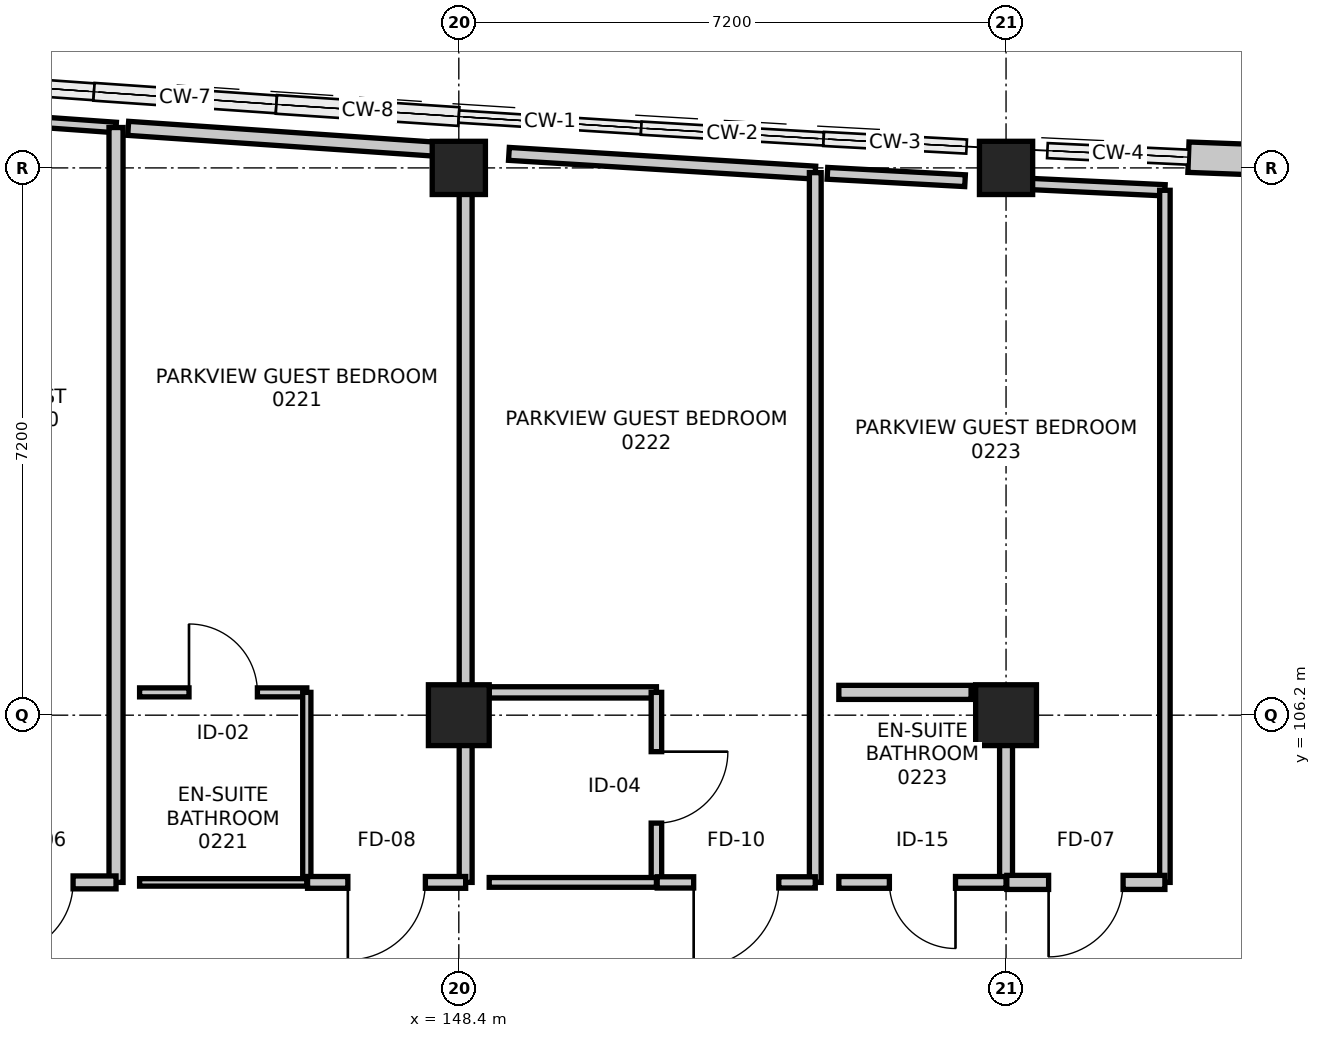
"""IFC4 building model, lengths in metres.
Left out: names, types, materials, properties, quantities, classifications, styles, units other than length and angle.
Written with IfcOpenShell. Run it as: python <this file> out.ifc"""

import sys

from ifc_helpers import new_model, si_unit, direction, frame, frame_2d, origin, origin_2d, place, context, subcontext, project, spatial, rectangle, extrude, element, fill, save


model = new_model("IFC4")
c1 = context("Model", 3, precision=1e-05, world=origin(), true_north=direction((0.0, 1.0)))
c2 = subcontext(c1, "Body", "Model", "MODEL_VIEW")
j1 = project(units=[si_unit("LENGTHUNIT", "METRE"), si_unit("PLANEANGLEUNIT", "RADIAN")], contexts=[c1])
p1 = place(None, origin())
s1 = spatial("IfcSite", under=j1, at=p1, CompositionType="ELEMENT")
p2 = place(p1, origin())
s2 = spatial("IfcBuilding", under=s1, at=p2, CompositionType="ELEMENT")
p3 = place(p2, frame((0.0, 0.0, 10.5)))
s3 = spatial("IfcBuildingStorey", under=s2, at=p3, CompositionType="ELEMENT", Elevation=10.5)
p4 = place(p3, frame((148.4, 106.2, 0.0), z_axis=(0.0, 0.0, 1.0), x_axis=(1.0, 0.0, 0.0)))
e1 = element("IfcColumn", 1, at=p4, inside=s3, PredefinedType="COLUMN", context=c2, shape_type="SweptSolid", body=[
    extrude(rectangle(XDim=0.8, YDim=0.8, at=origin_2d()), origin(), (0.0, 0.0, 1.0), 4.5),
])
p5 = place(p3, frame((148.4, 113.4, 0.0), z_axis=(0.0, 0.0, 1.0), x_axis=(1.0, 0.0, 0.0)))
e2 = element("IfcColumn", 2, at=p5, inside=s3, PredefinedType="COLUMN", context=c2, shape_type="SweptSolid", body=[
    extrude(rectangle(XDim=0.7, YDim=0.7, at=origin_2d()), origin(), (0.0, 0.0, 1.0), 4.5),
])
p6 = place(p3, frame((155.6, 106.2, 0.0), z_axis=(0.0, 0.0, 1.0), x_axis=(1.0, 0.0, 0.0)))
e3 = element("IfcColumn", 3, at=p6, inside=s3, PredefinedType="COLUMN", context=c2, shape_type="SweptSolid", body=[
    extrude(rectangle(XDim=0.8, YDim=0.8, at=origin_2d()), origin(), (0.0, 0.0, 1.0), 4.5),
])
p7 = place(p3, frame((155.6, 113.4, 0.0), z_axis=(0.0, 0.0, 1.0), x_axis=(1.0, 0.0, 0.0)))
e4 = element("IfcColumn", 4, at=p7, inside=s3, PredefinedType="COLUMN", context=c2, shape_type="SweptSolid", body=[
    extrude(rectangle(XDim=0.7, YDim=0.7, at=origin_2d()), origin(), (0.0, 0.0, 1.0), 4.5),
])
p8 = place(p3, frame((158.0, 113.541, 0.0), z_axis=(0.0, 0.0, 1.0), x_axis=(0.99930757318, -0.037207179225, 0.0)))
e5 = element("IfcWall", 5, at=p8, inside=s3, PredefinedType="STANDARD", context=c2, shape_type="SweptSolid", body=[
    extrude(rectangle(XDim=2.402, YDim=0.4, at=frame_2d((1.201, 0.0))), origin(), (0.0, 0.0, 1.0), 3.455),
])
p9 = place(p3, frame((139.45, 114.247, 0.0), z_axis=(0.0, 0.0, 1.0), x_axis=(0.997489787664, -0.070810475964, 0.0)))
e6 = element("IfcWall", 6, at=p9, inside=s3, PredefinedType="PARTITIONING", context=c2, shape_type="SweptSolid", body=[
    extrude(rectangle(XDim=4.451, YDim=0.138, at=frame_2d((2.226, 0.0))), origin(), (0.0, 0.0, 1.0), 3.796),
])
p10 = place(p3, frame((143.89, 113.931, 0.0), z_axis=(0.0, 0.0, 1.0), x_axis=(0.0, -1.0, 0.0)))
e7 = element("IfcWall", 7, at=p10, inside=s3, PredefinedType="PARTITIONING", context=c2, shape_type="SweptSolid", body=[
    extrude(rectangle(XDim=9.931, YDim=0.185, at=frame_2d((4.966, 0.0))), origin(), (0.0, 0.0, 1.0), 3.455),
])
p11 = place(p3, frame((143.89, 104.0, 0.0), z_axis=(0.0, 0.0, 1.0), x_axis=(-1.0, 0.0, 0.0)))
e8 = element("IfcWall", 8, at=p11, inside=s3, PredefinedType="PARTITIONING", context=c2, shape_type="SweptSolid", body=[
    extrude(rectangle(XDim=2.08, YDim=0.17, at=frame_2d((1.04, 0.0))), origin(), (0.0, 0.0, 1.0), 4.22),
])
p12 = place(p11, frame((0.565, 0.0, 0.0)))
e9 = element("IfcOpeningElement", 9, at=p12, cuts=e8, PredefinedType="OPENING", context=c2, shape_type="SweptSolid", body=[
    extrude(rectangle(XDim=0.95, YDim=2.1, at=frame_2d((0.475, 1.05))), frame((0.0, 0.095, 0.0), z_axis=(0.0, -1.0, 0.0), x_axis=(1.0, 0.0, 0.0)), (0.0, 0.0, 1.0), 0.19),
])
p13 = place(p3, frame((144.2, 106.5, 0.0), z_axis=(0.0, 0.0, 1.0), x_axis=(1.0, 0.0, 0.0)))
e10 = element("IfcWall", 10, at=p13, inside=s3, PredefinedType="PARTITIONING", context=c2, shape_type="SweptSolid", body=[
    extrude(rectangle(XDim=2.2, YDim=0.118, at=frame_2d((1.1, 0.0))), origin(), (0.0, 0.0, 1.0), 3.455),
])
p14 = place(p13, frame((0.65, 0.0, 0.0)))
e11 = element("IfcOpeningElement", 11, at=p14, cuts=e10, PredefinedType="OPENING", context=c2, shape_type="SweptSolid", body=[
    extrude(rectangle(XDim=0.9, YDim=2.08, at=frame_2d((0.45, 1.04))), frame((0.0, 0.069, 0.0), z_axis=(0.0, -1.0, 0.0), x_axis=(1.0, 0.0, 0.0)), (0.0, 0.0, 1.0), 0.138),
])
p15 = place(p3, frame((146.4, 106.5, 0.0), z_axis=(0.0, 0.0, 1.0), x_axis=(0.0, -1.0, 0.0)))
e12 = element("IfcWall", 12, at=p15, inside=s3, PredefinedType="PARTITIONING", context=c2, shape_type="SweptSolid", body=[
    extrude(rectangle(XDim=2.5, YDim=0.108, at=frame_2d((1.25, 0.0))), origin(), (0.0, 0.0, 1.0), 3.455),
])
p16 = place(p3, frame((146.4, 104.0, 0.0), z_axis=(0.0, 0.0, 1.0), x_axis=(-1.0, 0.0, 0.0)))
e13 = element("IfcWall", 13, at=p16, inside=s3, PredefinedType="PARTITIONING", context=c2, shape_type="SweptSolid", body=[
    extrude(rectangle(XDim=2.2, YDim=0.098, at=frame_2d((1.1, 0.0))), origin(), (0.0, 0.0, 1.0), 4.22),
])
p17 = place(p3, frame((144.05, 113.92, 0.0), z_axis=(0.0, 0.0, 1.0), x_axis=(0.997715366376, -0.067557736031, 0.0)))
e14 = element("IfcWall", 14, at=p17, inside=s3, PredefinedType="PARTITIONING", context=c2, shape_type="SweptSolid", body=[
    extrude(rectangle(XDim=4.04, YDim=0.185, at=frame_2d((2.02, 0.0))), origin(), (0.0, 0.0, 1.0), 3.455),
])
p18 = place(p3, frame((148.49, 113.21, 0.0), z_axis=(0.0, 0.0, 1.0), x_axis=(0.0, -1.0, 0.0)))
e15 = element("IfcWall", 15, at=p18, inside=s3, PredefinedType="PARTITIONING", context=c2, shape_type="SweptSolid", body=[
    extrude(rectangle(XDim=9.21, YDim=0.17, at=frame_2d((4.605, 0.0))), origin(), (0.0, 0.0, 1.0), 3.555),
])
p19 = place(p3, frame((148.49, 104.0, 0.0), z_axis=(0.0, 0.0, 1.0), x_axis=(-1.0, 0.0, 0.0)))
e16 = element("IfcWall", 16, at=p19, inside=s3, PredefinedType="PARTITIONING", context=c2, shape_type="SweptSolid", body=[
    extrude(rectangle(XDim=2.08, YDim=0.155, at=frame_2d((1.04, 0.0))), origin(), (0.0, 0.0, 1.0), 3.555),
])
p20 = place(p19, frame((0.53, 0.0, 0.0)))
e17 = element("IfcOpeningElement", 17, at=p20, cuts=e16, PredefinedType="OPENING", context=c2, shape_type="SweptSolid", body=[
    extrude(rectangle(XDim=1.02, YDim=2.15, at=frame_2d((0.51, 1.075))), frame((0.0, 0.087, 0.0), z_axis=(0.0, -1.0, 0.0), x_axis=(1.0, 0.0, 0.0)), (0.0, 0.0, 1.0), 0.175),
])
p21 = place(p3, frame((148.8, 106.5, 0.0), z_axis=(0.0, 0.0, 1.0), x_axis=(1.0, 0.0, 0.0)))
e18 = element("IfcWall", 18, at=p21, inside=s3, PredefinedType="PARTITIONING", context=c2, shape_type="SweptSolid", body=[
    extrude(rectangle(XDim=2.2, YDim=0.148, at=frame_2d((1.1, 0.0))), origin(), (0.0, 0.0, 1.0), 3.455),
])
p22 = place(p3, frame((151.0, 106.5, 0.0), z_axis=(0.0, 0.0, 1.0), x_axis=(0.0, -1.0, 0.0)))
e19 = element("IfcWall", 19, at=p22, inside=s3, PredefinedType="PARTITIONING", context=c2, shape_type="SweptSolid", body=[
    extrude(rectangle(XDim=2.5, YDim=0.138, at=frame_2d((1.25, 0.0))), origin(), (0.0, 0.0, 1.0), 3.455),
])
p23 = place(p22, frame((0.78, 0.0, 0.0)))
e20 = element("IfcOpeningElement", 20, at=p23, cuts=e19, PredefinedType="OPENING", context=c2, shape_type="SweptSolid", body=[
    extrude(rectangle(XDim=0.94, YDim=2.12, at=frame_2d((0.47, 1.06))), frame((0.0, 0.079, 0.0), z_axis=(0.0, -1.0, 0.0), x_axis=(1.0, 0.0, 0.0)), (0.0, 0.0, 1.0), 0.158),
])
p24 = place(p3, frame((151.0, 104.0, 0.0), z_axis=(0.0, 0.0, 1.0), x_axis=(-1.0, 0.0, 0.0)))
e21 = element("IfcWall", 21, at=p24, inside=s3, PredefinedType="PARTITIONING", context=c2, shape_type="SweptSolid", body=[
    extrude(rectangle(XDim=2.2, YDim=0.128, at=frame_2d((1.1, 0.0))), origin(), (0.0, 0.0, 1.0), 4.22),
])
p25 = place(p3, frame((149.059, 113.584, 0.0), z_axis=(0.0, 0.0, 1.0), x_axis=(0.998134042628, -0.0610608954, 0.0)))
e22 = element("IfcWall", 22, at=p25, inside=s3, PredefinedType="PARTITIONING", context=c2, shape_type="SweptSolid", body=[
    extrude(rectangle(XDim=4.038, YDim=0.17, at=frame_2d((2.019, 0.0))), origin(), (0.0, 0.0, 1.0), 3.455),
])
p26 = place(p3, frame((153.09, 113.338, 0.0), z_axis=(0.0, 0.0, 1.0), x_axis=(0.0, -1.0, 0.0)))
e23 = element("IfcWall", 23, at=p26, inside=s3, PredefinedType="PARTITIONING", context=c2, shape_type="SweptSolid", body=[
    extrude(rectangle(XDim=9.338, YDim=0.155, at=frame_2d((4.669, 0.0))), origin(), (0.0, 0.0, 1.0), 3.455),
])
p27 = place(p3, frame((153.09, 104.0, 0.0), z_axis=(0.0, 0.0, 1.0), x_axis=(-1.0, 0.0, 0.0)))
e24 = element("IfcWall", 24, at=p27, inside=s3, PredefinedType="PARTITIONING", context=c2, shape_type="SweptSolid", body=[
    extrude(rectangle(XDim=2.08, YDim=0.148, at=frame_2d((1.04, 0.0))), origin(), (0.0, 0.0, 1.0), 4.22),
])
p28 = place(p27, frame((0.48, 0.0, 0.0)))
e25 = element("IfcOpeningElement", 25, at=p28, cuts=e24, PredefinedType="OPENING", context=c2, shape_type="SweptSolid", body=[
    extrude(rectangle(XDim=1.12, YDim=2.2, at=frame_2d((0.56, 1.1))), frame((0.0, 0.084, 0.0), z_axis=(0.0, -1.0, 0.0), x_axis=(1.0, 0.0, 0.0)), (0.0, 0.0, 1.0), 0.168),
])
p29 = place(p3, frame((153.4, 106.5, 0.0), z_axis=(0.0, 0.0, 1.0), x_axis=(1.0, 0.0, 0.0)))
e26 = element("IfcWall", 26, at=p29, inside=s3, PredefinedType="PARTITIONING", context=c2, shape_type="SweptSolid", body=[
    extrude(rectangle(XDim=1.74, YDim=0.185, at=frame_2d((0.87, 0.0))), origin(), (0.0, 0.0, 1.0), 3.455),
])
p30 = place(p3, frame((155.6, 106.04, 0.0), z_axis=(0.0, 0.0, 1.0), x_axis=(0.0, -1.0, 0.0)))
e27 = element("IfcWall", 27, at=p30, inside=s3, PredefinedType="PARTITIONING", context=c2, shape_type="SweptSolid", body=[
    extrude(rectangle(XDim=2.04, YDim=0.17, at=frame_2d((1.02, 0.0))), origin(), (0.0, 0.0, 1.0), 3.555),
])
p31 = place(p3, frame((155.6, 104.0, 0.0), z_axis=(0.0, 0.0, 1.0), x_axis=(-1.0, 0.0, 0.0)))
e28 = element("IfcWall", 28, at=p31, inside=s3, PredefinedType="PARTITIONING", context=c2, shape_type="SweptSolid", body=[
    extrude(rectangle(XDim=2.2, YDim=0.155, at=frame_2d((1.1, 0.0))), origin(), (0.0, 0.0, 1.0), 3.555),
])
p32 = place(p31, frame((0.665, 0.0, 0.0)))
e29 = element("IfcOpeningElement", 29, at=p32, cuts=e28, PredefinedType="OPENING", context=c2, shape_type="SweptSolid", body=[
    extrude(rectangle(XDim=0.87, YDim=2.07, at=frame_2d((0.435, 1.035))), frame((0.0, 0.087, 0.0), z_axis=(0.0, -1.0, 0.0), x_axis=(1.0, 0.0, 0.0)), (0.0, 0.0, 1.0), 0.175),
])
p33 = place(p3, frame((153.25, 113.329, 0.0), z_axis=(0.0, 0.0, 1.0), x_axis=(0.998570186617, -0.053456359774, 0.0)))
e30 = element("IfcWall", 30, at=p33, inside=s3, PredefinedType="PARTITIONING", context=c2, shape_type="SweptSolid", body=[
    extrude(rectangle(XDim=1.813, YDim=0.155, at=frame_2d((0.907, 0.0))), origin(), (0.0, 0.0, 1.0), 3.455),
])
p34 = place(p3, frame((155.88, 113.19, 0.0), z_axis=(0.0, 0.0, 1.0), x_axis=(0.998900514589, -0.046880293874, 0.0)))
e31 = element("IfcWall", 31, at=p34, inside=s3, PredefinedType="PARTITIONING", context=c2, shape_type="SweptSolid", body=[
    extrude(rectangle(XDim=1.812, YDim=0.148, at=frame_2d((0.906, 0.0))), origin(), (0.0, 0.0, 1.0), 3.455),
])
p35 = place(p3, frame((157.69, 113.105, 0.0), z_axis=(0.0, 0.0, 1.0), x_axis=(0.0, -1.0, 0.0)))
e32 = element("IfcWall", 32, at=p35, inside=s3, PredefinedType="PARTITIONING", context=c2, shape_type="SweptSolid", body=[
    extrude(rectangle(XDim=9.105, YDim=0.138, at=frame_2d((4.553, 0.0))), origin(), (0.0, 0.0, 1.0), 3.455),
])
p36 = place(p3, frame((157.69, 104.0, 0.0), z_axis=(0.0, 0.0, 1.0), x_axis=(-1.0, 0.0, 0.0)))
e33 = element("IfcWall", 33, at=p36, inside=s3, PredefinedType="PARTITIONING", context=c2, shape_type="SweptSolid", body=[
    extrude(rectangle(XDim=2.08, YDim=0.185, at=frame_2d((1.04, 0.0))), origin(), (0.0, 0.0, 1.0), 3.555),
])
p37 = place(p36, frame((0.55, 0.0, 0.0)))
e34 = element("IfcOpeningElement", 34, at=p37, cuts=e33, PredefinedType="OPENING", context=c2, shape_type="SweptSolid", body=[
    extrude(rectangle(XDim=0.98, YDim=2.15, at=frame_2d((0.49, 1.075))), frame((0.0, 0.103, 0.0), z_axis=(0.0, -1.0, 0.0), x_axis=(1.0, 0.0, 0.0)), (0.0, 0.0, 1.0), 0.205),
])
p38 = place(p12, origin())
e35 = element("IfcDoor", 35, at=p38, inside=s3, OperationType="SINGLE_SWING_RIGHT", PredefinedType="DOOR", context=c2, shape_type="SweptSolid", body=[
    extrude(rectangle(XDim=0.95, YDim=2.1, at=frame_2d((0.475, 1.05))), frame((0.0, 0.025, 0.0), z_axis=(0.0, -1.0, 0.0), x_axis=(1.0, 0.0, 0.0)), (0.0, 0.0, 1.0), 0.05),
])
fill(e9, e35)
p39 = place(p14, origin())
e36 = element("IfcDoor", 36, at=p39, inside=s3, OperationType="SINGLE_SWING_LEFT", PredefinedType="DOOR", context=c2, shape_type="SweptSolid", body=[
    extrude(rectangle(XDim=0.9, YDim=2.08, at=frame_2d((0.45, 1.04))), frame((0.0, 0.025, 0.0), z_axis=(0.0, -1.0, 0.0), x_axis=(1.0, 0.0, 0.0)), (0.0, 0.0, 1.0), 0.05),
])
fill(e11, e36)
p40 = place(p20, origin())
e37 = element("IfcDoor", 37, at=p40, inside=s3, OperationType="SINGLE_SWING_RIGHT", PredefinedType="DOOR", context=c2, shape_type="SweptSolid", body=[
    extrude(rectangle(XDim=1.02, YDim=2.15, at=frame_2d((0.51, 1.075))), frame((0.0, 0.025, 0.0), z_axis=(0.0, -1.0, 0.0), x_axis=(1.0, 0.0, 0.0)), (0.0, 0.0, 1.0), 0.05),
])
fill(e17, e37)
p41 = place(p23, origin())
e38 = element("IfcDoor", 38, at=p41, inside=s3, OperationType="SINGLE_SWING_LEFT", PredefinedType="DOOR", context=c2, shape_type="SweptSolid", body=[
    extrude(rectangle(XDim=0.94, YDim=2.12, at=frame_2d((0.47, 1.06))), frame((0.0, 0.025, 0.0), z_axis=(0.0, -1.0, 0.0), x_axis=(1.0, 0.0, 0.0)), (0.0, 0.0, 1.0), 0.05),
])
fill(e20, e38)
p42 = place(p28, origin())
e39 = element("IfcDoor", 39, at=p42, inside=s3, OperationType="SINGLE_SWING_RIGHT", PredefinedType="DOOR", context=c2, shape_type="SweptSolid", body=[
    extrude(rectangle(XDim=1.12, YDim=2.2, at=frame_2d((0.56, 1.1))), frame((0.0, 0.025, 0.0), z_axis=(0.0, -1.0, 0.0), x_axis=(1.0, 0.0, 0.0)), (0.0, 0.0, 1.0), 0.05),
])
fill(e25, e39)
p43 = place(p32, origin())
e40 = element("IfcDoor", 40, at=p43, inside=s3, OperationType="SINGLE_SWING_LEFT", PredefinedType="DOOR", context=c2, shape_type="SweptSolid", body=[
    extrude(rectangle(XDim=0.87, YDim=2.07, at=frame_2d((0.435, 1.035))), frame((0.0, 0.025, 0.0), z_axis=(0.0, -1.0, 0.0), x_axis=(1.0, 0.0, 0.0)), (0.0, 0.0, 1.0), 0.05),
])
fill(e29, e40)
p44 = place(p37, origin())
e41 = element("IfcDoor", 41, at=p44, inside=s3, OperationType="SINGLE_SWING_RIGHT", PredefinedType="DOOR", context=c2, shape_type="SweptSolid", body=[
    extrude(rectangle(XDim=0.98, YDim=2.15, at=frame_2d((0.49, 1.075))), frame((0.0, 0.025, 0.0), z_axis=(0.0, -1.0, 0.0), x_axis=(1.0, 0.0, 0.0)), (0.0, 0.0, 1.0), 0.05),
])
fill(e34, e41)
save(model, sys.argv[1])
